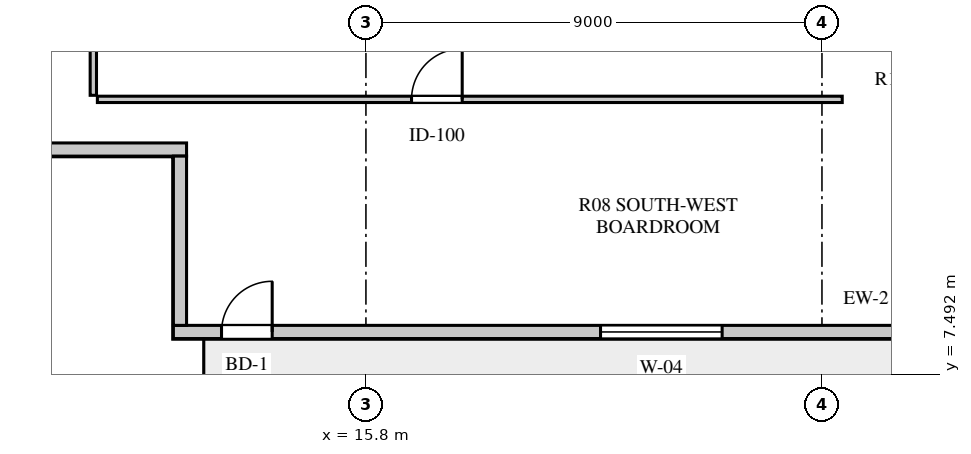
"""IFC4 building model, lengths in metres.
Left out: names, types, materials, properties, quantities, classifications, styles, units other than length and angle.
Written with IfcOpenShell. Run it as: python <this file> out.ifc"""

import sys

from ifc_helpers import new_model, si_unit, direction, frame, frame_2d, origin, place, context, subcontext, project, spatial, rectangle, extrude, element, fill, save


model = new_model("IFC4")
c1 = context("Model", 3, precision=1e-05, world=origin(), true_north=direction((0.0, 1.0)))
c2 = subcontext(c1, "Body", "Model", "MODEL_VIEW")
j1 = project(units=[si_unit("LENGTHUNIT", "METRE"), si_unit("PLANEANGLEUNIT", "RADIAN")], contexts=[c1])
p1 = place(None, origin())
s1 = spatial("IfcSite", under=j1, at=p1, CompositionType="ELEMENT")
p2 = place(p1, origin())
s2 = spatial("IfcBuilding", under=s1, at=p2, CompositionType="ELEMENT")
p3 = place(p2, frame((0.0, 0.0, 90.0)))
s3 = spatial("IfcBuildingStorey", under=s2, at=p3, CompositionType="ELEMENT", Elevation=90.0)
p4 = place(p3, frame((12.0, 8.33, 0.0), z_axis=(0.0, 0.0, 1.0), x_axis=(1.0, 0.0, 0.0)))
e1 = element("IfcWall", 1, at=p4, inside=s3, PredefinedType="SOLIDWALL", context=c2, shape_type="SweptSolid", body=[
    extrude(rectangle(XDim=34.6, YDim=0.26, at=frame_2d((17.3, 0.0))), origin(), (0.0, 0.0, 1.0), 3.7),
])
p5 = place(p4, frame((0.95, 0.0, 0.0)))
e2 = element("IfcOpeningElement", 2, at=p5, cuts=e1, PredefinedType="OPENING", context=c2, shape_type="SweptSolid", body=[
    extrude(rectangle(XDim=1.0, YDim=2.05, at=frame_2d((0.5, 1.025))), frame((0.0, 0.14, 0.0), z_axis=(0.0, -1.0, 0.0), x_axis=(1.0, 0.0, 0.0)), (0.0, 0.0, 1.0), 0.28),
])
p6 = place(p4, frame((8.43, 0.0, 0.8)))
e3 = element("IfcOpeningElement", 3, at=p6, cuts=e1, PredefinedType="OPENING", context=c2, shape_type="SweptSolid", body=[
    extrude(rectangle(XDim=2.4, YDim=2.05, at=frame_2d((1.2, 1.025))), frame((0.0, 0.14, 0.0), z_axis=(0.0, -1.0, 0.0), x_axis=(1.0, 0.0, 0.0)), (0.0, 0.0, 1.0), 0.28),
])
p7 = place(p4, frame((18.85, 0.0, 0.8)))
e4 = element("IfcOpeningElement", 4, at=p7, cuts=e1, PredefinedType="OPENING", context=c2, shape_type="SweptSolid", body=[
    extrude(rectangle(XDim=2.1, YDim=1.95, at=frame_2d((1.05, 0.975))), frame((0.0, 0.14, 0.0), z_axis=(0.0, -1.0, 0.0), x_axis=(1.0, 0.0, 0.0)), (0.0, 0.0, 1.0), 0.28),
])
p8 = place(p4, frame((23.485, 0.0, 0.8)))
e5 = element("IfcOpeningElement", 5, at=p8, cuts=e1, PredefinedType="OPENING", context=c2, shape_type="SweptSolid", body=[
    extrude(rectangle(XDim=1.35, YDim=1.9, at=frame_2d((0.675, 0.95))), frame((0.0, 0.14, 0.0), z_axis=(0.0, -1.0, 0.0), x_axis=(1.0, 0.0, 0.0)), (0.0, 0.0, 1.0), 0.28),
])
p9 = place(p4, frame((29.48, 0.0, 0.8)))
e6 = element("IfcOpeningElement", 6, at=p9, cuts=e1, PredefinedType="OPENING", context=c2, shape_type="SweptSolid", body=[
    extrude(rectangle(XDim=1.65, YDim=1.95, at=frame_2d((0.825, 0.975))), frame((0.0, 0.14, 0.0), z_axis=(0.0, -1.0, 0.0), x_axis=(1.0, 0.0, 0.0)), (0.0, 0.0, 1.0), 0.28),
])
p10 = place(p3, frame((8.4, 11.93, 0.0), z_axis=(0.0, 0.0, 1.0), x_axis=(1.0, 0.0, 0.0)))
e7 = element("IfcWall", 7, at=p10, inside=s3, PredefinedType="SOLIDWALL", context=c2, shape_type="SweptSolid", body=[
    extrude(rectangle(XDim=3.86, YDim=0.26, at=frame_2d((1.93, 0.0))), origin(), (0.0, 0.0, 1.0), 3.7),
])
p11 = place(p3, frame((12.13, 11.8, 0.0), z_axis=(0.0, 0.0, 1.0), x_axis=(0.0, -1.0, 0.0)))
e8 = element("IfcWall", 8, at=p11, inside=s3, PredefinedType="SOLIDWALL", context=c2, shape_type="SweptSolid", body=[
    extrude(rectangle(XDim=3.34, YDim=0.26, at=frame_2d((1.67, 0.0))), origin(), (0.0, 0.0, 1.0), 3.7),
])
p12 = place(p3, frame((10.42, 13.0, 0.0), z_axis=(0.0, 0.0, 1.0), x_axis=(0.0, 1.0, 0.0)))
e9 = element("IfcWall", 9, at=p12, inside=s3, PredefinedType="PLUMBINGWALL", context=c2, shape_type="SweptSolid", body=[
    extrude(rectangle(XDim=31.2, YDim=0.125, at=frame_2d((15.6, 0.0))), origin(), (0.0, 0.0, 1.0), 3.7),
])
p13 = place(p12, frame((5.0, 0.0, 0.0)))
e10 = element("IfcOpeningElement", 10, at=p13, cuts=e9, PredefinedType="OPENING", context=c2, shape_type="SweptSolid", body=[
    extrude(rectangle(XDim=0.95, YDim=2.08, at=frame_2d((0.475, 1.04))), frame((0.0, 0.073, 0.0), z_axis=(0.0, -1.0, 0.0), x_axis=(1.0, 0.0, 0.0)), (0.0, 0.0, 1.0), 0.145),
])
p14 = place(p12, frame((11.65, 0.0, 0.0)))
e11 = element("IfcOpeningElement", 11, at=p14, cuts=e9, PredefinedType="OPENING", context=c2, shape_type="SweptSolid", body=[
    extrude(rectangle(XDim=0.95, YDim=2.08, at=frame_2d((0.475, 1.04))), frame((0.0, 0.073, 0.0), z_axis=(0.0, -1.0, 0.0), x_axis=(1.0, 0.0, 0.0)), (0.0, 0.0, 1.0), 0.145),
])
p15 = place(p12, frame((18.65, 0.0, 0.0)))
e12 = element("IfcOpeningElement", 12, at=p15, cuts=e9, PredefinedType="OPENING", context=c2, shape_type="SweptSolid", body=[
    extrude(rectangle(XDim=0.95, YDim=2.08, at=frame_2d((0.475, 1.04))), frame((0.0, 0.073, 0.0), z_axis=(0.0, -1.0, 0.0), x_axis=(1.0, 0.0, 0.0)), (0.0, 0.0, 1.0), 0.145),
])
p16 = place(p12, frame((25.3, 0.0, 0.0)))
e13 = element("IfcOpeningElement", 13, at=p16, cuts=e9, PredefinedType="OPENING", context=c2, shape_type="SweptSolid", body=[
    extrude(rectangle(XDim=0.95, YDim=2.08, at=frame_2d((0.475, 1.04))), frame((0.0, 0.073, 0.0), z_axis=(0.0, -1.0, 0.0), x_axis=(1.0, 0.0, 0.0)), (0.0, 0.0, 1.0), 0.145),
])
p17 = place(p3, frame((10.5, 12.92, 0.0), z_axis=(0.0, 0.0, 1.0), x_axis=(1.0, 0.0, 0.0)))
e14 = element("IfcWall", 14, at=p17, inside=s3, PredefinedType="PLUMBINGWALL", context=c2, shape_type="SweptSolid", body=[
    extrude(rectangle(XDim=14.7, YDim=0.125, at=frame_2d((7.35, 0.0))), origin(), (0.0, 0.0, 1.0), 3.7),
])
p18 = place(p17, frame((6.2, 0.0, 0.0)))
e15 = element("IfcOpeningElement", 15, at=p18, cuts=e14, PredefinedType="OPENING", context=c2, shape_type="SweptSolid", body=[
    extrude(rectangle(XDim=1.0, YDim=2.08, at=frame_2d((0.5, 1.04))), frame((0.0, 0.073, 0.0), z_axis=(0.0, -1.0, 0.0), x_axis=(1.0, 0.0, 0.0)), (0.0, 0.0, 1.0), 0.145),
])
p19 = place(p5, frame((1.0, 0.0, 0.0), z_axis=(0.0, 0.0, 1.0), x_axis=(-1.0, 0.0, 0.0)))
e16 = element("IfcDoor", 16, at=p19, inside=s3, OperationType="SINGLE_SWING_LEFT", PredefinedType="DOOR", context=c2, shape_type="SweptSolid", body=[
    extrude(rectangle(XDim=1.0, YDim=2.05, at=frame_2d((0.5, 1.025))), frame((0.0, 0.025, 0.0), z_axis=(0.0, -1.0, 0.0), x_axis=(1.0, 0.0, 0.0)), (0.0, 0.0, 1.0), 0.05),
])
fill(e2, e16)
p20 = place(p6, origin())
e17 = element("IfcWindow", 17, at=p20, inside=s3, PartitioningType="SINGLE_PANEL", PredefinedType="WINDOW", context=c2, shape_type="SweptSolid", body=[
    extrude(rectangle(XDim=2.4, YDim=2.05, at=frame_2d((1.2, 1.025))), frame((0.0, 0.03, 0.0), z_axis=(0.0, -1.0, 0.0), x_axis=(1.0, 0.0, 0.0)), (0.0, 0.0, 1.0), 0.06),
])
fill(e3, e17)
p21 = place(p18, frame((1.0, 0.0, 0.0), z_axis=(0.0, 0.0, 1.0), x_axis=(-1.0, 0.0, 0.0)))
e18 = element("IfcDoor", 18, at=p21, inside=s3, OperationType="SINGLE_SWING_LEFT", PredefinedType="DOOR", context=c2, shape_type="SweptSolid", body=[
    extrude(rectangle(XDim=1.0, YDim=2.08, at=frame_2d((0.5, 1.04))), frame((0.0, 0.025, 0.0), z_axis=(0.0, -1.0, 0.0), x_axis=(1.0, 0.0, 0.0)), (0.0, 0.0, 1.0), 0.05),
])
fill(e15, e18)
save(model, sys.argv[1])
